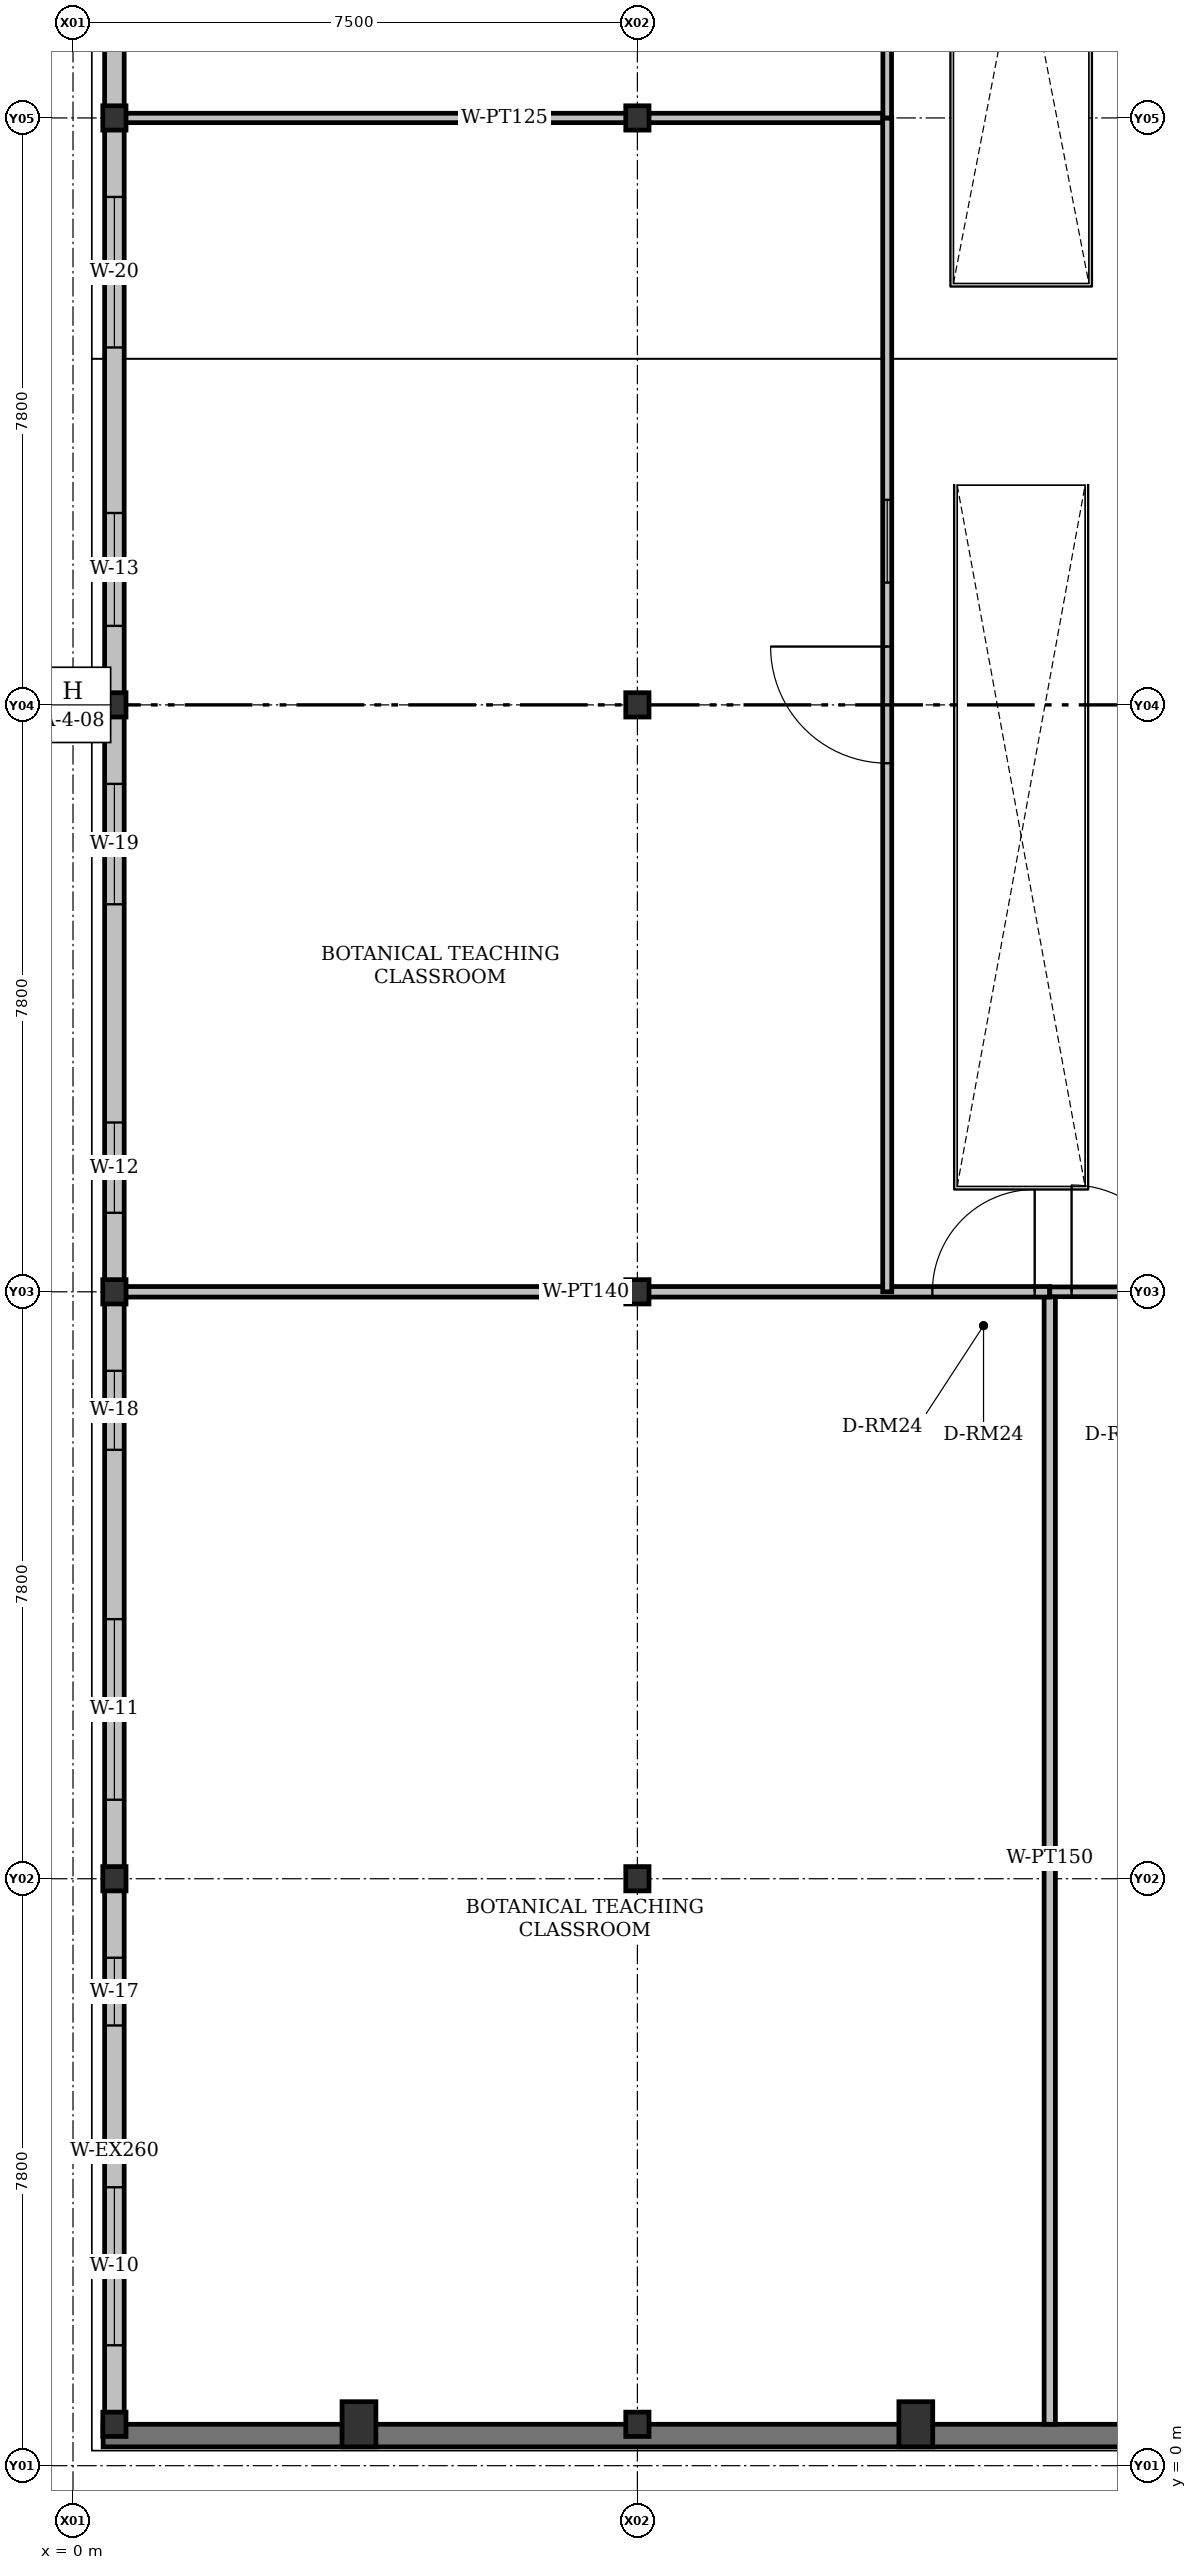
"""IFC4 building model, lengths in metres.
Left out: names, types, materials, properties, quantities, classifications, styles, units other than length and angle.
Written with IfcOpenShell. Run it as: python <this file> out.ifc"""

import sys

from ifc_helpers import new_model, si_unit, direction, frame, frame_2d, origin, origin_2d, place, context, subcontext, project, spatial, rectangle, i_section, extrude, element, fill, save


model = new_model("IFC4")
c1 = context("Model", 3, precision=1e-05, world=origin(), true_north=direction((0.0, 1.0)))
c2 = subcontext(c1, "Body", "Model", "MODEL_VIEW")
j1 = project(units=[si_unit("LENGTHUNIT", "METRE"), si_unit("PLANEANGLEUNIT", "RADIAN")], contexts=[c1])
p1 = place(None, origin())
s1 = spatial("IfcSite", under=j1, at=p1, CompositionType="ELEMENT")
p2 = place(p1, origin())
s2 = spatial("IfcBuilding", under=s1, at=p2, CompositionType="ELEMENT")
p3 = place(p2, frame((0.0, 0.0, 5.4)))
s3 = spatial("IfcBuildingStorey", under=s2, at=p3, CompositionType="ELEMENT", Elevation=5.4)
for number, where, z_axis, x_axis in (
    (1, (0.55, 0.55, 0.0), (0.0, 0.0, 1.0), (1.0, 0.0, 0.0)),
    (2, (0.55, 7.8, 0.0), (0.0, 0.0, 1.0), (1.0, 0.0, 0.0)),
    (3, (0.55, 15.6, 0.0), (0.0, 0.0, 1.0), (1.0, 0.0, 0.0)),
    (4, (0.55, 23.4, 0.0), (0.0, 0.0, 1.0), (1.0, 0.0, 0.0)),
    (5, (0.55, 31.2, 0.0), (0.0, 0.0, 1.0), (1.0, 0.0, 0.0)),
    (6, (7.5, 0.55, 0.0), (0.0, 0.0, 1.0), (1.0, 0.0, 0.0)),
    (7, (7.5, 7.8, 0.0), (0.0, 0.0, 1.0), (1.0, 0.0, 0.0)),
    (8, (7.5, 15.6, 0.0), (0.0, 0.0, 1.0), (1.0, 0.0, 0.0)),
    (9, (7.5, 23.4, 0.0), (0.0, 0.0, 1.0), (1.0, 0.0, 0.0)),
    (10, (7.5, 31.2, 0.0), (0.0, 0.0, 1.0), (1.0, 0.0, 0.0)),
):
    element("IfcColumn", number, at=place(p3, frame(where, z_axis=z_axis, x_axis=x_axis)), inside=s3, PredefinedType="COLUMN", context=c2, shape_type="SweptSolid", body=[
        extrude(i_section(OverallWidth=0.309, OverallDepth=0.323, WebThickness=0.014, FlangeThickness=0.023, FilletRadius=0.015, at=origin_2d()), origin(), (0.0, 0.0, 1.0), 4.5),
    ])
for number, where, z_axis, x_axis in (
    (11, (3.8, 0.55, 0.0), (0.0, 0.0, 1.0), (1.0, 0.0, 0.0)),
    (12, (11.2, 0.55, 0.0), (0.0, 0.0, 1.0), (1.0, 0.0, 0.0)),
):
    element("IfcColumn", number, at=place(p3, frame(where, z_axis=z_axis, x_axis=x_axis)), inside=s3, PredefinedType="PILASTER", context=c2, shape_type="SweptSolid", body=[
        extrude(rectangle(XDim=0.45, YDim=0.6, at=origin_2d()), origin(), (0.0, 0.0, 1.0), 4.5),
    ])
p4 = place(p3, frame((29.6, 0.4, 0.0), z_axis=(0.0, 0.0, 1.0), x_axis=(-1.0, 0.0, 0.0)))
e13 = element("IfcWall", 13, at=p4, inside=s3, PredefinedType="SOLIDWALL", context=c2, shape_type="SweptSolid", body=[
    extrude(rectangle(XDim=29.2, YDim=0.3, at=frame_2d((14.6, 0.0))), origin(), (0.0, 0.0, 1.0), 4.31),
])
p5 = place(p3, frame((0.55, 0.55, 0.0), z_axis=(0.0, 0.0, 1.0), x_axis=(0.0, 1.0, 0.0)))
e14 = element("IfcWall", 14, at=p5, inside=s3, PredefinedType="SOLIDWALL", context=c2, shape_type="SweptSolid", body=[
    extrude(rectangle(XDim=7.25, YDim=0.26, at=frame_2d((3.625, 0.0))), origin(), (0.0, 0.0, 1.0), 3.832),
])
p6 = place(p5, frame((1.05, 0.0, 0.92)))
e15 = element("IfcOpeningElement", 15, at=p6, cuts=e14, PredefinedType="OPENING", context=c2, shape_type="SweptSolid", body=[
    extrude(rectangle(XDim=2.1, YDim=1.55, at=frame_2d((1.05, 0.775))), frame((0.0, 0.13, 0.0), z_axis=(0.0, -1.0, 0.0), x_axis=(1.0, 0.0, 0.0)), (0.0, 0.0, 1.0), 0.26),
])
p7 = place(p5, frame((5.3, 0.0, 0.92)))
e16 = element("IfcOpeningElement", 16, at=p7, cuts=e14, PredefinedType="OPENING", context=c2, shape_type="SweptSolid", body=[
    extrude(rectangle(XDim=0.9, YDim=1.3, at=frame_2d((0.45, 0.65))), frame((0.0, 0.13, 0.0), z_axis=(0.0, -1.0, 0.0), x_axis=(1.0, 0.0, 0.0)), (0.0, 0.0, 1.0), 0.26),
])
p8 = place(p3, frame((0.55, 7.8, 0.0), z_axis=(0.0, 0.0, 1.0), x_axis=(0.0, 1.0, 0.0)))
e17 = element("IfcWall", 17, at=p8, inside=s3, PredefinedType="SOLIDWALL", context=c2, shape_type="SweptSolid", body=[
    extrude(rectangle(XDim=7.8, YDim=0.26, at=frame_2d((3.9, 0.0))), origin(), (0.0, 0.0, 1.0), 3.832),
])
p9 = place(p8, frame((1.05, 0.0, 0.92)))
e18 = element("IfcOpeningElement", 18, at=p9, cuts=e17, PredefinedType="OPENING", context=c2, shape_type="SweptSolid", body=[
    extrude(rectangle(XDim=2.4, YDim=1.55, at=frame_2d((1.2, 0.775))), frame((0.0, 0.13, 0.0), z_axis=(0.0, -1.0, 0.0), x_axis=(1.0, 0.0, 0.0)), (0.0, 0.0, 1.0), 0.26),
])
p10 = place(p8, frame((5.7, 0.0, 0.92)))
e19 = element("IfcOpeningElement", 19, at=p10, cuts=e17, PredefinedType="OPENING", context=c2, shape_type="SweptSolid", body=[
    extrude(rectangle(XDim=1.05, YDim=1.3, at=frame_2d((0.525, 0.65))), frame((0.0, 0.13, 0.0), z_axis=(0.0, -1.0, 0.0), x_axis=(1.0, 0.0, 0.0)), (0.0, 0.0, 1.0), 0.26),
])
p11 = place(p3, frame((0.55, 15.6, 0.0), z_axis=(0.0, 0.0, 1.0), x_axis=(0.0, 1.0, 0.0)))
e20 = element("IfcWall", 20, at=p11, inside=s3, PredefinedType="SOLIDWALL", context=c2, shape_type="SweptSolid", body=[
    extrude(rectangle(XDim=7.8, YDim=0.26, at=frame_2d((3.9, 0.0))), origin(), (0.0, 0.0, 1.0), 3.832),
])
p12 = place(p11, frame((1.05, 0.0, 0.92)))
e21 = element("IfcOpeningElement", 21, at=p12, cuts=e20, PredefinedType="OPENING", context=c2, shape_type="SweptSolid", body=[
    extrude(rectangle(XDim=1.2, YDim=1.7, at=frame_2d((0.6, 0.85))), frame((0.0, 0.13, 0.0), z_axis=(0.0, -1.0, 0.0), x_axis=(1.0, 0.0, 0.0)), (0.0, 0.0, 1.0), 0.26),
])
p13 = place(p11, frame((5.15, 0.0, 0.92)))
e22 = element("IfcOpeningElement", 22, at=p13, cuts=e20, PredefinedType="OPENING", context=c2, shape_type="SweptSolid", body=[
    extrude(rectangle(XDim=1.6, YDim=1.35, at=frame_2d((0.8, 0.675))), frame((0.0, 0.13, 0.0), z_axis=(0.0, -1.0, 0.0), x_axis=(1.0, 0.0, 0.0)), (0.0, 0.0, 1.0), 0.26),
])
p14 = place(p3, frame((0.55, 23.4, 0.0), z_axis=(0.0, 0.0, 1.0), x_axis=(0.0, 1.0, 0.0)))
e23 = element("IfcWall", 23, at=p14, inside=s3, PredefinedType="SOLIDWALL", context=c2, shape_type="SweptSolid", body=[
    extrude(rectangle(XDim=7.8, YDim=0.26, at=frame_2d((3.9, 0.0))), origin(), (0.0, 0.0, 1.0), 3.832),
])
p15 = place(p14, frame((1.05, 0.0, 0.92)))
e24 = element("IfcOpeningElement", 24, at=p15, cuts=e23, PredefinedType="OPENING", context=c2, shape_type="SweptSolid", body=[
    extrude(rectangle(XDim=1.5, YDim=1.7, at=frame_2d((0.75, 0.85))), frame((0.0, 0.13, 0.0), z_axis=(0.0, -1.0, 0.0), x_axis=(1.0, 0.0, 0.0)), (0.0, 0.0, 1.0), 0.26),
])
p16 = place(p14, frame((4.75, 0.0, 0.92)))
e25 = element("IfcOpeningElement", 25, at=p16, cuts=e23, PredefinedType="OPENING", context=c2, shape_type="SweptSolid", body=[
    extrude(rectangle(XDim=2.0, YDim=1.35, at=frame_2d((1.0, 0.675))), frame((0.0, 0.13, 0.0), z_axis=(0.0, -1.0, 0.0), x_axis=(1.0, 0.0, 0.0)), (0.0, 0.0, 1.0), 0.26),
])
p17 = place(p3, frame((0.55, 31.2, 0.0), z_axis=(0.0, 0.0, 1.0), x_axis=(0.0, 1.0, 0.0)))
e26 = element("IfcWall", 26, at=p17, inside=s3, PredefinedType="SOLIDWALL", context=c2, shape_type="SweptSolid", body=[
    extrude(rectangle(XDim=7.8, YDim=0.26, at=frame_2d((3.9, 0.0))), origin(), (0.0, 0.0, 1.0), 3.832),
])
p18 = place(p17, frame((1.05, 0.0, 0.92)))
e27 = element("IfcOpeningElement", 27, at=p18, cuts=e26, PredefinedType="OPENING", context=c2, shape_type="SweptSolid", body=[
    extrude(rectangle(XDim=1.8, YDim=1.7, at=frame_2d((0.9, 0.85))), frame((0.0, 0.13, 0.0), z_axis=(0.0, -1.0, 0.0), x_axis=(1.0, 0.0, 0.0)), (0.0, 0.0, 1.0), 0.26),
])
p19 = place(p17, frame((5.55, 0.0, 0.92)))
e28 = element("IfcOpeningElement", 28, at=p19, cuts=e26, PredefinedType="OPENING", context=c2, shape_type="SweptSolid", body=[
    extrude(rectangle(XDim=1.2, YDim=1.4, at=frame_2d((0.6, 0.7))), frame((0.0, 0.13, 0.0), z_axis=(0.0, -1.0, 0.0), x_axis=(1.0, 0.0, 0.0)), (0.0, 0.0, 1.0), 0.26),
])
p20 = place(p3, frame((12.98, 0.55, 0.0), z_axis=(0.0, 0.0, 1.0), x_axis=(0.0, 1.0, 0.0)))
e29 = element("IfcWall", 29, at=p20, inside=s3, PredefinedType="PARTITIONING", context=c2, shape_type="SweptSolid", body=[
    extrude(rectangle(XDim=15.05, YDim=0.15, at=frame_2d((7.525, 0.0))), origin(), (0.0, 0.0, 1.0), 3.756),
])
p21 = place(p3, frame((0.65, 15.6, 0.0), z_axis=(0.0, 0.0, 1.0), x_axis=(1.0, 0.0, 0.0)))
e30 = element("IfcWall", 30, at=p21, inside=s3, PredefinedType="PARTITIONING", context=c2, shape_type="SweptSolid", body=[
    extrude(rectangle(XDim=12.33, YDim=0.14, at=frame_2d((6.165, 0.0))), origin(), (0.0, 0.0, 1.0), 3.756),
])
p22 = place(p21, frame((10.77, 0.0, 0.0)))
e31 = element("IfcOpeningElement", 31, at=p22, cuts=e30, PredefinedType="OPENING", context=c2, shape_type="SweptSolid", body=[
    extrude(rectangle(XDim=1.36, YDim=2.25, at=frame_2d((0.68, 1.125))), frame((0.0, 0.07, 0.0), z_axis=(0.0, -1.0, 0.0), x_axis=(1.0, 0.0, 0.0)), (0.0, 0.0, 1.0), 0.14),
])
p23 = place(p3, frame((12.98, 15.6, 0.0), z_axis=(0.0, 0.0, 1.0), x_axis=(1.0, 0.0, 0.0)))
e32 = element("IfcWall", 32, at=p23, inside=s3, PredefinedType="PARTITIONING", context=c2, shape_type="SweptSolid", body=[
    extrude(rectangle(XDim=16.321, YDim=0.13, at=frame_2d((8.16, 0.0))), origin(), (0.0, 0.0, 1.0), 3.756),
])
p24 = place(p23, frame((0.29, 0.0, 0.0)))
e33 = element("IfcOpeningElement", 33, at=p24, cuts=e32, PredefinedType="OPENING", context=c2, shape_type="SweptSolid", body=[
    extrude(rectangle(XDim=1.42, YDim=2.3, at=frame_2d((0.71, 1.15))), frame((0.0, 0.065, 0.0), z_axis=(0.0, -1.0, 0.0), x_axis=(1.0, 0.0, 0.0)), (0.0, 0.0, 1.0), 0.13),
])
p25 = place(p3, frame((0.65, 31.2, 0.0), z_axis=(0.0, 0.0, 1.0), x_axis=(1.0, 0.0, 0.0)))
e34 = element("IfcWall", 34, at=p25, inside=s3, PredefinedType="PARTITIONING", context=c2, shape_type="SweptSolid", body=[
    extrude(rectangle(XDim=10.17, YDim=0.125, at=frame_2d((5.085, 0.0))), origin(), (0.0, 0.0, 1.0), 3.756),
])
p26 = place(p3, frame((10.82, 15.6, 0.0), z_axis=(0.0, 0.0, 1.0), x_axis=(0.0, 1.0, 0.0)))
e35 = element("IfcWall", 35, at=p26, inside=s3, PredefinedType="PARTITIONING", context=c2, shape_type="SweptSolid", body=[
    extrude(rectangle(XDim=15.6, YDim=0.12, at=frame_2d((7.8, 0.0))), origin(), (0.0, 0.0, 1.0), 3.756),
])
p27 = place(p26, frame((7.025, 0.0, 0.0)))
e36 = element("IfcOpeningElement", 36, at=p27, cuts=e35, PredefinedType="OPENING", context=c2, shape_type="SweptSolid", body=[
    extrude(rectangle(XDim=1.55, YDim=2.3, at=frame_2d((0.775, 1.15))), frame((0.0, 0.06, 0.0), z_axis=(0.0, -1.0, 0.0), x_axis=(1.0, 0.0, 0.0)), (0.0, 0.0, 1.0), 0.12),
])
p28 = place(p26, frame((9.425, 0.0, 0.92)))
e37 = element("IfcOpeningElement", 37, at=p28, cuts=e35, PredefinedType="OPENING", context=c2, shape_type="SweptSolid", body=[
    extrude(rectangle(XDim=1.1, YDim=1.1, at=frame_2d((0.55, 0.55))), frame((0.0, 0.06, 0.0), z_axis=(0.0, -1.0, 0.0), x_axis=(1.0, 0.0, 0.0)), (0.0, 0.0, 1.0), 0.12),
])
p29 = place(p3, frame((10.82, 31.2, 0.0), z_axis=(0.0, 0.0, 1.0), x_axis=(0.0, 1.0, 0.0)))
e38 = element("IfcWall", 38, at=p29, inside=s3, PredefinedType="PARTITIONING", context=c2, shape_type="SweptSolid", body=[
    extrude(rectangle(XDim=22.95, YDim=0.115, at=frame_2d((11.475, 0.0))), origin(), (0.0, 0.0, 1.0), 3.756),
])
p30 = place(p29, frame((10.675, 0.0, 0.0)))
e39 = element("IfcOpeningElement", 39, at=p30, cuts=e38, PredefinedType="OPENING", context=c2, shape_type="SweptSolid", body=[
    extrude(rectangle(XDim=1.65, YDim=2.3, at=frame_2d((0.825, 1.15))), frame((0.0, 0.058, 0.0), z_axis=(0.0, -1.0, 0.0), x_axis=(1.0, 0.0, 0.0)), (0.0, 0.0, 1.0), 0.115),
])
p31 = place(p29, frame((13.175, 0.0, 0.92)))
e40 = element("IfcOpeningElement", 40, at=p31, cuts=e38, PredefinedType="OPENING", context=c2, shape_type="SweptSolid", body=[
    extrude(rectangle(XDim=1.25, YDim=1.1, at=frame_2d((0.625, 0.55))), frame((0.0, 0.058, 0.0), z_axis=(0.0, -1.0, 0.0), x_axis=(1.0, 0.0, 0.0)), (0.0, 0.0, 1.0), 0.115),
])
p32 = place(p6, origin())
e41 = element("IfcWindow", 41, at=p32, inside=s3, PartitioningType="DOUBLE_PANEL_VERTICAL", PredefinedType="WINDOW", context=c2, shape_type="SweptSolid", body=[
    extrude(rectangle(XDim=2.1, YDim=1.55, at=frame_2d((1.05, 0.775))), frame((0.0, 0.03, 0.0), z_axis=(0.0, -1.0, 0.0), x_axis=(1.0, 0.0, 0.0)), (0.0, 0.0, 1.0), 0.06),
])
fill(e15, e41)
p33 = place(p7, origin())
e42 = element("IfcWindow", 42, at=p33, inside=s3, PartitioningType="SINGLE_PANEL", PredefinedType="WINDOW", context=c2, shape_type="SweptSolid", body=[
    extrude(rectangle(XDim=0.9, YDim=1.3, at=frame_2d((0.45, 0.65))), frame((0.0, 0.03, 0.0), z_axis=(0.0, -1.0, 0.0), x_axis=(1.0, 0.0, 0.0)), (0.0, 0.0, 1.0), 0.06),
])
fill(e16, e42)
p34 = place(p9, origin())
e43 = element("IfcWindow", 43, at=p34, inside=s3, PartitioningType="DOUBLE_PANEL_VERTICAL", PredefinedType="WINDOW", context=c2, shape_type="SweptSolid", body=[
    extrude(rectangle(XDim=2.4, YDim=1.55, at=frame_2d((1.2, 0.775))), frame((0.0, 0.03, 0.0), z_axis=(0.0, -1.0, 0.0), x_axis=(1.0, 0.0, 0.0)), (0.0, 0.0, 1.0), 0.06),
])
fill(e18, e43)
p35 = place(p10, origin())
e44 = element("IfcWindow", 44, at=p35, inside=s3, PartitioningType="SINGLE_PANEL", PredefinedType="WINDOW", context=c2, shape_type="SweptSolid", body=[
    extrude(rectangle(XDim=1.05, YDim=1.3, at=frame_2d((0.525, 0.65))), frame((0.0, 0.03, 0.0), z_axis=(0.0, -1.0, 0.0), x_axis=(1.0, 0.0, 0.0)), (0.0, 0.0, 1.0), 0.06),
])
fill(e19, e44)
p36 = place(p12, origin())
e45 = element("IfcWindow", 45, at=p36, inside=s3, PartitioningType="SINGLE_PANEL", PredefinedType="WINDOW", context=c2, shape_type="SweptSolid", body=[
    extrude(rectangle(XDim=1.2, YDim=1.7, at=frame_2d((0.6, 0.85))), frame((0.0, 0.03, 0.0), z_axis=(0.0, -1.0, 0.0), x_axis=(1.0, 0.0, 0.0)), (0.0, 0.0, 1.0), 0.06),
])
fill(e21, e45)
p37 = place(p13, origin())
e46 = element("IfcWindow", 46, at=p37, inside=s3, PartitioningType="DOUBLE_PANEL_VERTICAL", PredefinedType="WINDOW", context=c2, shape_type="SweptSolid", body=[
    extrude(rectangle(XDim=1.6, YDim=1.35, at=frame_2d((0.8, 0.675))), frame((0.0, 0.03, 0.0), z_axis=(0.0, -1.0, 0.0), x_axis=(1.0, 0.0, 0.0)), (0.0, 0.0, 1.0), 0.06),
])
fill(e22, e46)
p38 = place(p15, origin())
e47 = element("IfcWindow", 47, at=p38, inside=s3, PartitioningType="SINGLE_PANEL", PredefinedType="WINDOW", context=c2, shape_type="SweptSolid", body=[
    extrude(rectangle(XDim=1.5, YDim=1.7, at=frame_2d((0.75, 0.85))), frame((0.0, 0.03, 0.0), z_axis=(0.0, -1.0, 0.0), x_axis=(1.0, 0.0, 0.0)), (0.0, 0.0, 1.0), 0.06),
])
fill(e24, e47)
p39 = place(p16, origin())
e48 = element("IfcWindow", 48, at=p39, inside=s3, PartitioningType="DOUBLE_PANEL_VERTICAL", PredefinedType="WINDOW", context=c2, shape_type="SweptSolid", body=[
    extrude(rectangle(XDim=2.0, YDim=1.35, at=frame_2d((1.0, 0.675))), frame((0.0, 0.03, 0.0), z_axis=(0.0, -1.0, 0.0), x_axis=(1.0, 0.0, 0.0)), (0.0, 0.0, 1.0), 0.06),
])
fill(e25, e48)
p40 = place(p22, origin())
e49 = element("IfcDoor", 49, at=p40, inside=s3, OperationType="SINGLE_SWING_RIGHT", PredefinedType="DOOR", context=c2, shape_type="SweptSolid", body=[
    extrude(rectangle(XDim=1.36, YDim=2.25, at=frame_2d((0.68, 1.125))), frame((0.0, 0.025, 0.0), z_axis=(0.0, -1.0, 0.0), x_axis=(1.0, 0.0, 0.0)), (0.0, 0.0, 1.0), 0.05),
])
fill(e31, e49)
p41 = place(p24, origin())
e50 = element("IfcDoor", 50, at=p41, inside=s3, OperationType="SINGLE_SWING_LEFT", PredefinedType="DOOR", context=c2, shape_type="SweptSolid", body=[
    extrude(rectangle(XDim=1.42, YDim=2.3, at=frame_2d((0.71, 1.15))), frame((0.0, 0.025, 0.0), z_axis=(0.0, -1.0, 0.0), x_axis=(1.0, 0.0, 0.0)), (0.0, 0.0, 1.0), 0.05),
])
fill(e33, e50)
p42 = place(p27, origin())
e51 = element("IfcDoor", 51, at=p42, inside=s3, OperationType="SINGLE_SWING_RIGHT", PredefinedType="DOOR", context=c2, shape_type="SweptSolid", body=[
    extrude(rectangle(XDim=1.55, YDim=2.3, at=frame_2d((0.775, 1.15))), frame((0.0, 0.025, 0.0), z_axis=(0.0, -1.0, 0.0), x_axis=(1.0, 0.0, 0.0)), (0.0, 0.0, 1.0), 0.05),
])
fill(e36, e51)
p43 = place(p28, origin())
e52 = element("IfcWindow", 52, at=p43, inside=s3, PartitioningType="SINGLE_PANEL", PredefinedType="WINDOW", context=c2, shape_type="SweptSolid", body=[
    extrude(rectangle(XDim=1.1, YDim=1.1, at=frame_2d((0.55, 0.55))), frame((0.0, 0.03, 0.0), z_axis=(0.0, -1.0, 0.0), x_axis=(1.0, 0.0, 0.0)), (0.0, 0.0, 1.0), 0.06),
])
fill(e37, e52)
save(model, sys.argv[1])
